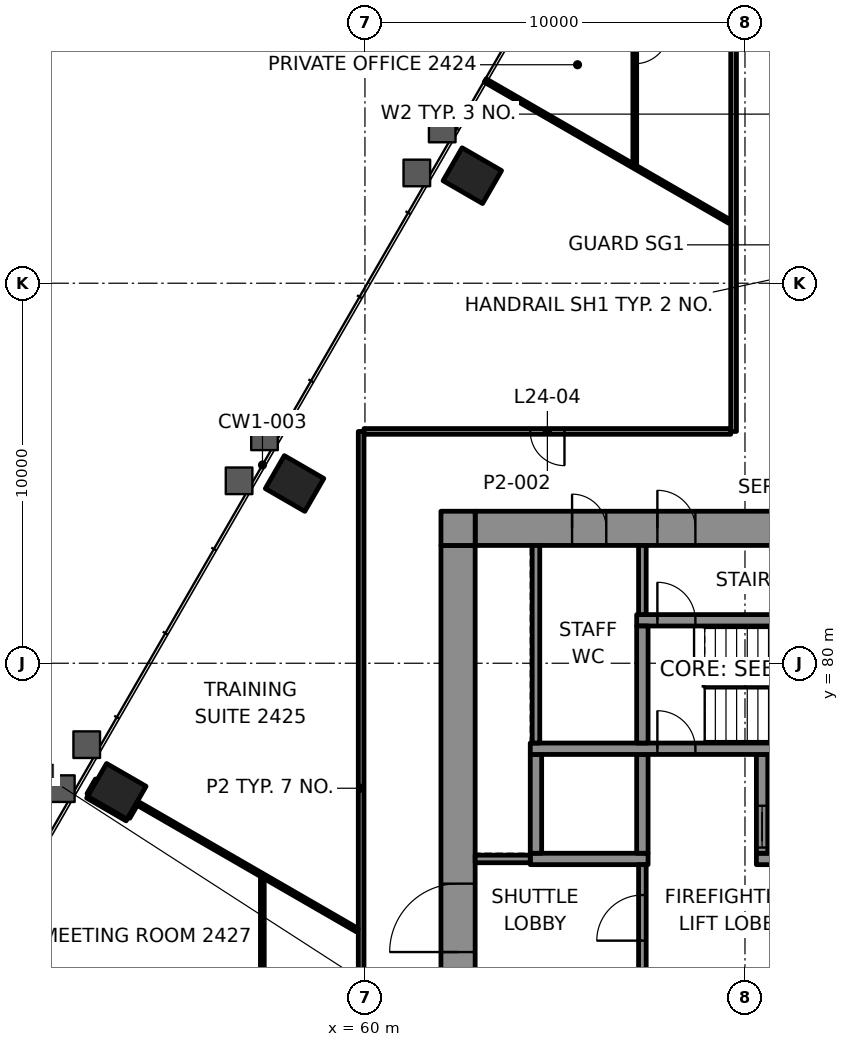
"""IFC4 building model, lengths in metres.
Left out: names, types, materials, properties, quantities, classifications, styles, units other than length and angle.
Written with IfcOpenShell. Run it as: python <this file> out.ifc"""

import sys

from ifc_helpers import new_model, si_unit, direction, frame, frame_2d, origin, origin_2d, place, context, subcontext, project, spatial, rectangle, extrude, element, fill, save


model = new_model("IFC4")
c1 = context("Model", 3, precision=1e-05, world=origin(), true_north=direction((0.0, 1.0)))
c2 = subcontext(c1, "Body", "Model", "MODEL_VIEW")
j1 = project(units=[si_unit("LENGTHUNIT", "METRE"), si_unit("PLANEANGLEUNIT", "RADIAN")], contexts=[c1])
p1 = place(None, origin())
s1 = spatial("IfcSite", under=j1, at=p1, CompositionType="ELEMENT")
p2 = place(p1, origin())
s2 = spatial("IfcBuilding", under=s1, at=p2, CompositionType="ELEMENT")
p3 = place(p2, frame((0.0, 0.0, 107.2)))
s3 = spatial("IfcBuildingStorey", under=s2, at=p3, CompositionType="ELEMENT", Elevation=107.2)
for number, where, z_axis, x_axis in (
    (1, (62.825, 92.83, -0.0), (0.0, 0.0, 1.0), (-0.5, -0.866, 0.0)),
    (2, (58.148, 84.729, -0.0), (0.0, 0.0, 1.0), (-0.5, -0.866, 0.0)),
    (3, (53.471, 76.628, -0.0), (0.0, 0.0, 1.0), (-0.5, -0.866, 0.0)),
):
    element("IfcColumn", number, at=place(p3, frame(where, z_axis=z_axis, x_axis=x_axis)), inside=s3, PredefinedType="COLUMN", context=c2, shape_type="SweptSolid", body=[
        extrude(rectangle(XDim=1.0, YDim=1.2, at=origin_2d()), origin(), (0.0, 0.0, 1.0), 4.2),
    ])
p4 = place(p3, frame((62.9, 83.55, 0.0), z_axis=(0.0, 0.0, 1.0), x_axis=(1.0, 0.0, 0.0)))
e4 = element("IfcWall", 4, at=p4, inside=s3, PredefinedType="SHEAR", context=c2, shape_type="SweptSolid", body=[
    extrude(rectangle(XDim=25.1, YDim=0.9, at=frame_2d((12.55, 0.0))), origin(), (0.0, 0.0, 1.0), 4.0),
])
p5 = place(p4, frame((4.795, 0.0, 0.0)))
e5 = element("IfcOpeningElement", 5, at=p5, cuts=e4, PredefinedType="OPENING", context=c2, shape_type="SweptSolid", body=[
    extrude(rectangle(XDim=1.0, YDim=2.1, at=frame_2d((0.5, 1.05))), frame((0.0, 0.46, 0.0), z_axis=(0.0, -1.0, 0.0), x_axis=(1.0, 0.0, 0.0)), (0.0, 0.0, 1.0), 0.92),
])
p6 = place(p4, frame((18.605, 0.0, 0.0)))
e6 = element("IfcOpeningElement", 6, at=p6, cuts=e4, PredefinedType="OPENING", context=c2, shape_type="SweptSolid", body=[
    extrude(rectangle(XDim=1.0, YDim=2.1, at=frame_2d((0.5, 1.05))), frame((0.0, 0.46, 0.0), z_axis=(0.0, -1.0, 0.0), x_axis=(1.0, 0.0, 0.0)), (0.0, 0.0, 1.0), 0.92),
])
p7 = place(p4, frame((2.55, 0.0, 0.0)))
e7 = element("IfcOpeningElement", 7, at=p7, cuts=e4, PredefinedType="OPENING", context=c2, shape_type="SweptSolid", body=[
    extrude(rectangle(XDim=0.9, YDim=2.1, at=frame_2d((0.45, 1.05))), frame((0.0, 0.46, 0.0), z_axis=(0.0, -1.0, 0.0), x_axis=(1.0, 0.0, 0.0)), (0.0, 0.0, 1.0), 0.92),
])
p8 = place(p4, frame((11.75, 0.0, 0.0)))
e8 = element("IfcOpeningElement", 8, at=p8, cuts=e4, PredefinedType="OPENING", context=c2, shape_type="SweptSolid", body=[
    extrude(rectangle(XDim=0.9, YDim=2.1, at=frame_2d((0.45, 1.05))), frame((0.0, 0.46, 0.0), z_axis=(0.0, -1.0, 0.0), x_axis=(1.0, 0.0, 0.0)), (0.0, 0.0, 1.0), 0.92),
])
p9 = place(p4, frame((21.65, 0.0, 0.0)))
e9 = element("IfcOpeningElement", 9, at=p9, cuts=e4, PredefinedType="OPENING", context=c2, shape_type="SweptSolid", body=[
    extrude(rectangle(XDim=0.9, YDim=2.1, at=frame_2d((0.45, 1.05))), frame((0.0, 0.46, 0.0), z_axis=(0.0, -1.0, 0.0), x_axis=(1.0, 0.0, 0.0)), (0.0, 0.0, 1.0), 0.92),
])
p10 = place(p3, frame((62.45, 66.9, 0.0), z_axis=(0.0, 0.0, 1.0), x_axis=(0.0, 1.0, 0.0)))
e10 = element("IfcWall", 10, at=p10, inside=s3, PredefinedType="SHEAR", context=c2, shape_type="SweptSolid", body=[
    extrude(rectangle(XDim=16.2, YDim=0.9, at=frame_2d((8.1, 0.0))), origin(), (0.0, 0.0, 1.0), 4.0),
])
p11 = place(p10, frame((5.5, 0.0, 0.0)))
e11 = element("IfcOpeningElement", 11, at=p11, cuts=e10, PredefinedType="OPENING", context=c2, shape_type="SweptSolid", body=[
    extrude(rectangle(XDim=1.8, YDim=2.1, at=frame_2d((0.9, 1.05))), frame((0.0, 0.46, 0.0), z_axis=(0.0, -1.0, 0.0), x_axis=(1.0, 0.0, 0.0)), (0.0, 0.0, 1.0), 0.92),
])
p12 = place(p3, frame((64.35, 74.85, 0.0), z_axis=(0.0, 0.0, 1.0), x_axis=(1.0, 0.0, 0.0)))
e12 = element("IfcWall", 12, at=p12, inside=s3, PredefinedType="SHEAR", context=c2, shape_type="SweptSolid", body=[
    extrude(rectangle(XDim=3.1, YDim=0.3, at=frame_2d((1.55, 0.0))), origin(), (0.0, 0.0, 1.0), 4.0),
])
p13 = place(p3, frame((70.3, 74.85, 0.0), z_axis=(0.0, 0.0, 1.0), x_axis=(1.0, 0.0, 0.0)))
e13 = element("IfcWall", 13, at=p13, inside=s3, PredefinedType="SHEAR", context=c2, shape_type="SweptSolid", body=[
    extrude(rectangle(XDim=16.8, YDim=0.3, at=frame_2d((8.4, 0.0))), origin(), (0.0, 0.0, 1.0), 4.0),
])
p14 = place(p13, frame((3.8, 0.0, 0.0)))
e14 = element("IfcOpeningElement", 14, at=p14, cuts=e13, PredefinedType="OPENING", context=c2, shape_type="SweptSolid", body=[
    extrude(rectangle(XDim=1.1, YDim=2.1, at=frame_2d((0.55, 1.05))), frame((0.0, 0.16, 0.0), z_axis=(0.0, -1.0, 0.0), x_axis=(1.0, 0.0, 0.0)), (0.0, 0.0, 1.0), 0.32),
])
p15 = place(p13, frame((12.2, 0.0, 0.0)))
e15 = element("IfcOpeningElement", 15, at=p15, cuts=e13, PredefinedType="OPENING", context=c2, shape_type="SweptSolid", body=[
    extrude(rectangle(XDim=1.1, YDim=2.1, at=frame_2d((0.55, 1.05))), frame((0.0, 0.16, 0.0), z_axis=(0.0, -1.0, 0.0), x_axis=(1.0, 0.0, 0.0)), (0.0, 0.0, 1.0), 0.32),
])
p16 = place(p13, frame((14.925, 0.0, 0.0)))
e16 = element("IfcOpeningElement", 16, at=p16, cuts=e13, PredefinedType="OPENING", context=c2, shape_type="SweptSolid", body=[
    extrude(rectangle(XDim=1.1, YDim=2.1, at=frame_2d((0.55, 1.05))), frame((0.0, 0.16, 0.0), z_axis=(0.0, -1.0, 0.0), x_axis=(1.0, 0.0, 0.0)), (0.0, 0.0, 1.0), 0.32),
])
for number, where, z_axis, x_axis in (
    (17, (64.5, 75.0, 0.0), (0.0, 0.0, 1.0), (0.0, 1.0, 0.0)),
    (18, (67.3, 75.0, 0.0), (0.0, 0.0, 1.0), (0.0, 1.0, 0.0)),
):
    element("IfcWall", number, at=place(p3, frame(where, z_axis=z_axis, x_axis=x_axis)), inside=s3, PredefinedType="SHEAR", context=c2, shape_type="SweptSolid", body=[
        extrude(rectangle(XDim=2.6, YDim=0.3, at=frame_2d((1.3, 0.0))), origin(), (0.0, 0.0, 1.0), 4.0),
    ])
p17 = place(p3, frame((70.45, 75.0, 0.0), z_axis=(0.0, 0.0, 1.0), x_axis=(0.0, 1.0, 0.0)))
e19 = element("IfcWall", 19, at=p17, inside=s3, PredefinedType="SHEAR", context=c2, shape_type="SweptSolid", body=[
    extrude(rectangle(XDim=2.6, YDim=0.3, at=frame_2d((1.3, 0.0))), origin(), (0.0, 0.0, 1.0), 4.0),
])
p18 = place(p17, frame((0.15, 0.0, 0.0)))
e20 = element("IfcOpeningElement", 20, at=p18, cuts=e19, PredefinedType="OPENING", context=c2, shape_type="SweptSolid", body=[
    extrude(rectangle(XDim=1.1, YDim=2.1, at=frame_2d((0.55, 1.05))), frame((0.0, 0.16, 0.0), z_axis=(0.0, -1.0, 0.0), x_axis=(1.0, 0.0, 0.0)), (0.0, 0.0, 1.0), 0.32),
])
p19 = place(p3, frame((64.35, 77.75, 0.0), z_axis=(0.0, 0.0, 1.0), x_axis=(1.0, 0.0, 0.0)))
e21 = element("IfcWall", 21, at=p19, inside=s3, PredefinedType="SHEAR", context=c2, shape_type="SweptSolid", body=[
    extrude(rectangle(XDim=22.75, YDim=0.3, at=frame_2d((11.375, 0.0))), origin(), (0.0, 0.0, 1.0), 4.0),
])
p20 = place(p19, frame((3.345, 0.0, 0.0)))
e22 = element("IfcOpeningElement", 22, at=p20, cuts=e21, PredefinedType="OPENING", context=c2, shape_type="SweptSolid", body=[
    extrude(rectangle(XDim=1.0, YDim=2.1, at=frame_2d((0.5, 1.05))), frame((0.0, 0.16, 0.0), z_axis=(0.0, -1.0, 0.0), x_axis=(1.0, 0.0, 0.0)), (0.0, 0.0, 1.0), 0.32),
])
p21 = place(p3, frame((67.15, 81.13, 0.0), z_axis=(0.0, 0.0, 1.0), x_axis=(1.0, 0.0, 0.0)))
e23 = element("IfcWall", 23, at=p21, inside=s3, PredefinedType="SHEAR", context=c2, shape_type="SweptSolid", body=[
    extrude(rectangle(XDim=6.91, YDim=0.3, at=frame_2d((3.455, 0.0))), origin(), (0.0, 0.0, 1.0), 4.0),
])
p22 = place(p21, frame((0.545, 0.0, 0.0)))
e24 = element("IfcOpeningElement", 24, at=p22, cuts=e23, PredefinedType="OPENING", context=c2, shape_type="SweptSolid", body=[
    extrude(rectangle(XDim=1.0, YDim=2.1, at=frame_2d((0.5, 1.05))), frame((0.0, 0.16, 0.0), z_axis=(0.0, -1.0, 0.0), x_axis=(1.0, 0.0, 0.0)), (0.0, 0.0, 1.0), 0.32),
])
p23 = place(p3, frame((67.3, 77.9, 0.0), z_axis=(0.0, 0.0, 1.0), x_axis=(0.0, 1.0, 0.0)))
e25 = element("IfcWall", 25, at=p23, inside=s3, PredefinedType="SHEAR", context=c2, shape_type="SweptSolid", body=[
    extrude(rectangle(XDim=3.08, YDim=0.3, at=frame_2d((1.54, 0.0))), origin(), (0.0, 0.0, 1.0), 4.0),
])
p24 = place(p3, frame((62.0, 83.55, 0.0), z_axis=(0.0, 0.0, 1.0), x_axis=(1.0, 0.0, 0.0)))
e26 = element("IfcWall", 26, at=p24, inside=s3, PredefinedType="SHEAR", context=c2, shape_type="SweptSolid", body=[
    extrude(rectangle(XDim=0.9, YDim=0.9, at=frame_2d((0.45, 0.0))), origin(), (0.0, 0.0, 1.0), 4.0),
])
p25 = place(p3, frame((69.625, 86.1, 0.0), z_axis=(0.0, 0.0, 1.0), x_axis=(-1.0, 0.0, 0.0)))
e27 = element("IfcWall", 27, at=p25, inside=s3, PredefinedType="PARTITIONING", context=c2, shape_type="SweptSolid", body=[
    extrude(rectangle(XDim=9.649, YDim=0.15, at=frame_2d((4.825, 0.0))), origin(), (0.0, 0.0, 1.0), 3.4),
])
p26 = place(p25, frame((4.375, 0.0, 0.0)))
e28 = element("IfcOpeningElement", 28, at=p26, cuts=e27, PredefinedType="OPENING", context=c2, shape_type="SweptSolid", body=[
    extrude(rectangle(XDim=0.9, YDim=2.1, at=frame_2d((0.45, 1.05))), frame((0.0, 0.085, 0.0), z_axis=(0.0, -1.0, 0.0), x_axis=(1.0, 0.0, 0.0)), (0.0, 0.0, 1.0), 0.17),
])
p27 = place(p3, frame((53.771, 75.948, 0.0), z_axis=(0.0, 0.0, 1.0), x_axis=(0.500246304613, 0.865883153041, 0.0)))
e29 = element("IfcWall", 29, at=p27, inside=s3, PredefinedType="PARTITIONING", context=c2, shape_type="SweptSolid", body=[
    extrude(rectangle(XDim=0.39, YDim=0.1, at=frame_2d((0.195, 0.0))), origin(), (0.0, 0.0, 1.0), 3.4),
])
p28 = place(p3, frame((52.73, 76.545, 0.0), z_axis=(0.0, 0.0, 1.0), x_axis=(0.49999285859, 0.86602952684, 0.0)))
e30 = element("IfcWall", 30, at=p28, inside=s3, PredefinedType="PARTITIONING", context=c2, shape_type="SweptSolid", body=[
    extrude(rectangle(XDim=0.443, YDim=0.1, at=frame_2d((0.221, 0.0))), origin(), (0.0, 0.0, 1.0), 3.4),
])
p29 = place(p3, frame((69.7, 86.1, 0.0), z_axis=(0.0, 0.0, 1.0), x_axis=(0.0, 1.0, 0.0)))
e31 = element("IfcWall", 31, at=p29, inside=s3, PredefinedType="PARTITIONING", context=c2, shape_type="SweptSolid", body=[
    extrude(rectangle(XDim=10.599, YDim=0.15, at=frame_2d((5.3, 0.0))), origin(), (0.0, 0.0, 1.0), 3.322),
])
p30 = place(p3, frame((67.1, 99.3, 0.0), z_axis=(0.0, 0.0, 1.0), x_axis=(0.0, -1.0, 0.0)))
e32 = element("IfcWall", 32, at=p30, inside=s3, PredefinedType="PARTITIONING", context=c2, shape_type="SweptSolid", body=[
    extrude(rectangle(XDim=6.15, YDim=0.1, at=frame_2d((3.075, 0.0))), origin(), (0.0, 0.0, 1.0), 3.4),
])
p31 = place(p30, frame((2.625, 0.0, 0.0)))
e33 = element("IfcOpeningElement", 33, at=p31, cuts=e32, PredefinedType="OPENING", context=c2, shape_type="SweptSolid", body=[
    extrude(rectangle(XDim=0.9, YDim=2.1, at=frame_2d((0.45, 1.05))), frame((0.0, 0.06, 0.0), z_axis=(0.0, -1.0, 0.0), x_axis=(1.0, 0.0, 0.0)), (0.0, 0.0, 1.0), 0.12),
])
p32 = place(p3, frame((59.9, 67.321, 0.0), z_axis=(0.0, 0.0, 1.0), x_axis=(0.0, 1.0, 0.0)))
e34 = element("IfcWall", 34, at=p32, inside=s3, PredefinedType="PARTITIONING", context=c2, shape_type="SweptSolid", body=[
    extrude(rectangle(XDim=18.778, YDim=0.15, at=frame_2d((9.389, 0.0))), origin(), (0.0, 0.0, 1.0), 3.4),
])
p33 = place(p3, frame((57.3, 68.88, 0.0), z_axis=(0.0, 0.0, 1.0), x_axis=(0.0, 1.0, 0.0)))
e35 = element("IfcWall", 35, at=p33, inside=s3, PredefinedType="PARTITIONING", context=c2, shape_type="SweptSolid", body=[
    extrude(rectangle(XDim=5.45, YDim=0.1, at=frame_2d((2.725, 0.0))), origin(), (0.0, 0.0, 1.0), 3.4),
])
p34 = place(p3, frame((69.599, 91.62, 0.0), z_axis=(0.0, 0.0, 1.0), x_axis=(-0.866018724091, 0.500011569389, 0.0)))
e36 = element("IfcWall", 36, at=p34, inside=s3, PredefinedType="PARTITIONING", context=c2, shape_type="SweptSolid", body=[
    extrude(rectangle(XDim=7.431, YDim=0.1, at=frame_2d((3.716, 0.0))), origin(), (0.0, 0.0, 1.0), 3.165),
])
p35 = place(p3, frame((59.799, 72.975, 0.0), z_axis=(0.0, 0.0, 1.0), x_axis=(-0.866037071789, 0.499979789879, 0.0)))
e37 = element("IfcWall", 37, at=p35, inside=s3, PredefinedType="PARTITIONING", context=c2, shape_type="SweptSolid", body=[
    extrude(rectangle(XDim=6.707, YDim=0.1, at=frame_2d((3.354, 0.0))), origin(), (0.0, 0.0, 1.0), 3.4),
])
p36 = place(p3, frame((53.741, 75.896, 0.0), z_axis=(0.0, 0.0, 1.0), x_axis=(-0.866094119867, 0.499880961361, 0.0)))
e38 = element("IfcWall", 38, at=p36, inside=s3, PredefinedType="PARTITIONING", context=c2, shape_type="SweptSolid", body=[
    extrude(rectangle(XDim=1.2, YDim=0.1, at=frame_2d((0.6, 0.0))), origin(), (0.0, 0.0, 1.0), 3.165),
])
p37 = place(p3, frame((56.223, 68.288, 0.0), z_axis=(0.0, 0.0, 1.0), x_axis=(-0.866018922649, 0.500011225488, 0.0)))
e39 = element("IfcWall", 39, at=p37, inside=s3, PredefinedType="PARTITIONING", context=c2, shape_type="SweptSolid", body=[
    extrude(rectangle(XDim=7.513, YDim=0.1, at=frame_2d((3.757, 0.0))), origin(), (0.0, 0.0, 1.0), 3.165),
])
p38 = place(p3, frame((62.9, 74.85, 0.0), z_axis=(0.0, 0.0, 1.0), x_axis=(1.0, 0.0, 0.0)))
e40 = element("IfcWall", 40, at=p38, inside=s3, PredefinedType="PARTITIONING", context=c2, shape_type="SweptSolid", body=[
    extrude(rectangle(XDim=1.45, YDim=0.2, at=frame_2d((0.725, 0.0))), origin(), (0.0, 0.0, 1.0), 4.0),
])
p39 = place(p3, frame((64.5, 77.9, 0.0), z_axis=(0.0, 0.0, 1.0), x_axis=(0.0, 1.0, 0.0)))
e41 = element("IfcWall", 41, at=p39, inside=s3, PredefinedType="PARTITIONING", context=c2, shape_type="SweptSolid", body=[
    extrude(rectangle(XDim=5.2, YDim=0.2, at=frame_2d((2.6, 0.0))), origin(), (0.0, 0.0, 1.0), 4.0),
])
p40 = place(p3, frame((67.3, 71.9, 0.0), z_axis=(0.0, 0.0, 1.0), x_axis=(0.0, 1.0, 0.0)))
e42 = element("IfcWall", 42, at=p40, inside=s3, PredefinedType="PARTITIONING", context=c2, shape_type="SweptSolid", body=[
    extrude(rectangle(XDim=2.8, YDim=0.2, at=frame_2d((1.4, 0.0))), origin(), (0.0, 0.0, 1.0), 4.0),
])
p41 = place(p40, frame((0.8, 0.0, 0.0)))
e43 = element("IfcOpeningElement", 43, at=p41, cuts=e42, PredefinedType="OPENING", context=c2, shape_type="SweptSolid", body=[
    extrude(rectangle(XDim=1.2, YDim=2.1, at=frame_2d((0.6, 1.05))), frame((0.0, 0.11, 0.0), z_axis=(0.0, -1.0, 0.0), x_axis=(1.0, 0.0, 0.0)), (0.0, 0.0, 1.0), 0.22),
])
p42 = place(p3, frame((67.3, 81.28, 0.0), z_axis=(0.0, 0.0, 1.0), x_axis=(0.0, 1.0, 0.0)))
e44 = element("IfcWall", 44, at=p42, inside=s3, PredefinedType="PARTITIONING", context=c2, shape_type="SweptSolid", body=[
    extrude(rectangle(XDim=1.82, YDim=0.2, at=frame_2d((0.91, 0.0))), origin(), (0.0, 0.0, 1.0), 4.0),
])
p43 = place(p26, origin())
e45 = element("IfcDoor", 45, at=p43, inside=s3, OperationType="SINGLE_SWING_LEFT", PredefinedType="DOOR", context=c2, shape_type="SweptSolid", body=[
    extrude(rectangle(XDim=0.9, YDim=2.1, at=frame_2d((0.45, 1.05))), frame((0.0, 0.025, 0.0), z_axis=(0.0, -1.0, 0.0), x_axis=(1.0, 0.0, 0.0)), (0.0, 0.0, 1.0), 0.05),
])
fill(e28, e45)
p44 = place(p31, origin())
e46 = element("IfcDoor", 46, at=p44, inside=s3, OperationType="SINGLE_SWING_RIGHT", PredefinedType="DOOR", context=c2, shape_type="SweptSolid", body=[
    extrude(rectangle(XDim=0.9, YDim=2.1, at=frame_2d((0.45, 1.05))), frame((0.0, 0.025, 0.0), z_axis=(0.0, -1.0, 0.0), x_axis=(1.0, 0.0, 0.0)), (0.0, 0.0, 1.0), 0.05),
])
fill(e33, e46)
p45 = place(p18, origin())
e47 = element("IfcDoor", 47, at=p45, inside=s3, OperationType="DOUBLE_DOOR_SLIDING", PredefinedType="DOOR", context=c2, shape_type="SweptSolid", body=[
    extrude(rectangle(XDim=1.1, YDim=2.1, at=frame_2d((0.55, 1.05))), frame((0.0, 0.025, 0.0), z_axis=(0.0, -1.0, 0.0), x_axis=(1.0, 0.0, 0.0)), (0.0, 0.0, 1.0), 0.05),
])
fill(e20, e47)
p46 = place(p20, origin())
e48 = element("IfcDoor", 48, at=p46, inside=s3, OperationType="SINGLE_SWING_LEFT", PredefinedType="DOOR", context=c2, shape_type="SweptSolid", body=[
    extrude(rectangle(XDim=1.0, YDim=2.1, at=frame_2d((0.5, 1.05))), frame((0.0, 0.025, 0.0), z_axis=(0.0, -1.0, 0.0), x_axis=(1.0, 0.0, 0.0)), (0.0, 0.0, 1.0), 0.05),
])
fill(e22, e48)
p47 = place(p22, origin())
e49 = element("IfcDoor", 49, at=p47, inside=s3, OperationType="SINGLE_SWING_RIGHT", PredefinedType="DOOR", context=c2, shape_type="SweptSolid", body=[
    extrude(rectangle(XDim=1.0, YDim=2.1, at=frame_2d((0.5, 1.05))), frame((0.0, 0.025, 0.0), z_axis=(0.0, -1.0, 0.0), x_axis=(1.0, 0.0, 0.0)), (0.0, 0.0, 1.0), 0.05),
])
fill(e24, e49)
p48 = place(p5, origin())
e50 = element("IfcDoor", 50, at=p48, inside=s3, OperationType="SINGLE_SWING_LEFT", PredefinedType="DOOR", context=c2, shape_type="SweptSolid", body=[
    extrude(rectangle(XDim=1.0, YDim=2.1, at=frame_2d((0.5, 1.05))), frame((0.0, 0.17, 0.0), z_axis=(0.0, -1.0, 0.0), x_axis=(1.0, 0.0, 0.0)), (0.0, 0.0, 1.0), 0.34),
])
fill(e5, e50)
p49 = place(p41, origin())
e51 = element("IfcDoor", 51, at=p49, inside=s3, OperationType="SINGLE_SWING_RIGHT", PredefinedType="DOOR", context=c2, shape_type="SweptSolid", body=[
    extrude(rectangle(XDim=1.2, YDim=2.1, at=frame_2d((0.6, 1.05))), frame((0.0, 0.025, 0.0), z_axis=(0.0, -1.0, 0.0), x_axis=(1.0, 0.0, 0.0)), (0.0, 0.0, 1.0), 0.05),
])
fill(e43, e51)
p50 = place(p11, origin())
e52 = element("IfcDoor", 52, at=p50, inside=s3, OperationType="SINGLE_SWING_LEFT", PredefinedType="DOOR", context=c2, shape_type="SweptSolid", body=[
    extrude(rectangle(XDim=1.8, YDim=2.1, at=frame_2d((0.9, 1.05))), frame((0.0, 0.17, 0.0), z_axis=(0.0, -1.0, 0.0), x_axis=(1.0, 0.0, 0.0)), (0.0, 0.0, 1.0), 0.34),
])
fill(e11, e52)
p51 = place(p7, origin())
e53 = element("IfcDoor", 53, at=p51, inside=s3, OperationType="SINGLE_SWING_RIGHT", PredefinedType="DOOR", context=c2, shape_type="SweptSolid", body=[
    extrude(rectangle(XDim=0.9, YDim=2.1, at=frame_2d((0.45, 1.05))), frame((0.0, 0.17, 0.0), z_axis=(0.0, -1.0, 0.0), x_axis=(1.0, 0.0, 0.0)), (0.0, 0.0, 1.0), 0.34),
])
fill(e7, e53)
save(model, sys.argv[1])
